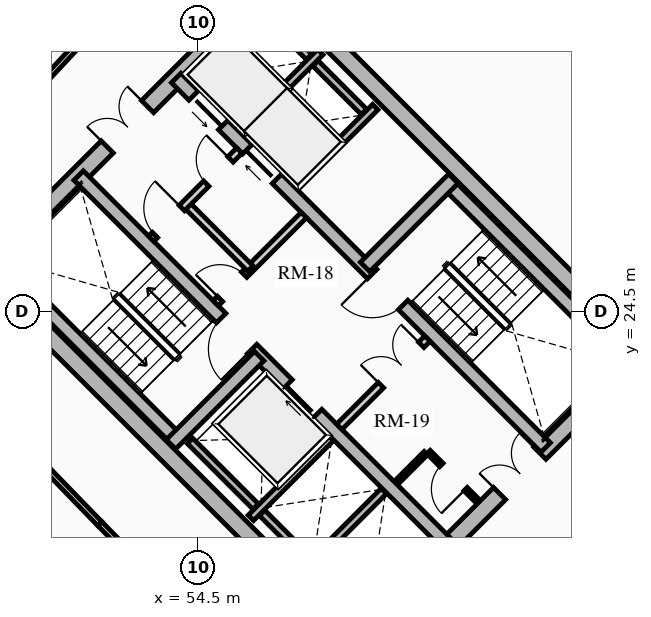
"""IFC4 building model, lengths in metres.
Left out: names, types, materials, properties, quantities, classifications, styles, units other than length and angle.
Written with IfcOpenShell. Run it as: python <this file> out.ifc"""

import sys

from ifc_helpers import new_model, si_unit, direction, frame, frame_2d, origin, place, context, subcontext, project, spatial, rectangle, extrude, source, transform, mapped, element, fill, save


model = new_model("IFC4")
c1 = context("Model", 3, precision=1e-05, world=origin(), true_north=direction((0.0, 1.0)))
c2 = subcontext(c1, "Body", "Model", "MODEL_VIEW")
j1 = project(units=[si_unit("LENGTHUNIT", "METRE"), si_unit("PLANEANGLEUNIT", "RADIAN")], contexts=[c1])
p1 = place(None, origin())
s1 = spatial("IfcSite", under=j1, at=p1, CompositionType="ELEMENT")
p2 = place(p1, origin())
s2 = spatial("IfcBuilding", under=s1, at=p2, CompositionType="ELEMENT")
p3 = place(p2, frame((0.0, 0.0, 113.8)))
s3 = spatial("IfcBuildingStorey", under=s2, at=p3, CompositionType="ELEMENT", Elevation=113.8)
for number, where, z_axis, x_axis in (
    (1, (58.737, 15.697, 0.0), (0.0, 0.0, 1.0), (-0.707, 0.707, 0.0)),
    (2, (66.303, 23.263, 0.0), (0.0, 0.0, 1.0), (-0.707, 0.707, 0.0)),
):
    element("IfcWall", number, at=place(p3, frame(where, z_axis=z_axis, x_axis=x_axis)), inside=s3, PredefinedType="SHEAR", context=c2, shape_type="SweptSolid", body=[
        extrude(rectangle(XDim=14.2, YDim=0.45, at=frame_2d((7.1, 0.0))), origin(), (0.0, 0.0, 1.0), 2.91),
    ])
p4 = place(p3, frame((58.578, 15.856, 0.0), z_axis=(0.0, 0.0, 1.0), x_axis=(0.707106781187, 0.707106781187, 0.0)))
e3 = element("IfcWall", 3, at=p4, inside=s3, PredefinedType="SHEAR", context=c2, shape_type="SweptSolid", body=[
    extrude(rectangle(XDim=10.7, YDim=0.45, at=frame_2d((5.35, 0.0))), origin(), (0.0, 0.0, 1.0), 2.91),
])
m1 = source(origin(), c2, "Body", "SweptSolid", [
    extrude(rectangle(XDim=1.5, YDim=2.02, at=frame_2d((0.75, 1.01))), frame((0.0, 0.235, 0.0), z_axis=(0.0, -1.0, 0.0), x_axis=(1.0, 0.0, 0.0)), (0.0, 0.0, 1.0), 0.47),
])
p5 = place(p4, frame((5.45, 0.0, 0.0)))
e4 = element("IfcOpeningElement", 4, at=p5, cuts=e3, PredefinedType="OPENING", context=c2, shape_type="MappedRepresentation", body=[
    mapped(m1, transform((0.0, 0.0, 0.0), x_axis=(1.0, 0.0, 0.0), y_axis=(0.0, 1.0, 0.0), z_axis=(0.0, 0.0, 1.0), scale=1.0)),
])
p6 = place(p3, frame((48.856, 25.578, 0.0), z_axis=(0.0, 0.0, 1.0), x_axis=(0.707106781187, 0.707106781187, 0.0)))
e5 = element("IfcWall", 5, at=p6, inside=s3, PredefinedType="SHEAR", context=c2, shape_type="SweptSolid", body=[
    extrude(rectangle(XDim=10.7, YDim=0.45, at=frame_2d((5.35, 0.0))), origin(), (0.0, 0.0, 1.0), 2.91),
])
p7 = place(p6, frame((4.6, 0.0, 0.0)))
e6 = element("IfcOpeningElement", 6, at=p7, cuts=e5, PredefinedType="OPENING", context=c2, shape_type="MappedRepresentation", body=[
    mapped(m1, transform((0.0, 0.0, 0.0), x_axis=(1.0, 0.0, 0.0), y_axis=(0.0, 1.0, 0.0), z_axis=(0.0, 0.0, 1.0), scale=1.0)),
])
p8 = place(p3, frame((61.078, 18.355, 0.0), z_axis=(0.0, 0.0, 1.0), x_axis=(-0.707106781187, 0.707106781187, 0.0)))
e7 = element("IfcWall", 7, at=p8, inside=s3, PredefinedType="SHEAR", context=c2, shape_type="SweptSolid", body=[
    extrude(rectangle(XDim=13.75, YDim=0.35, at=frame_2d((6.875, 0.0))), origin(), (0.0, 0.0, 1.0), 2.91),
])
m2 = source(origin(), c2, "Body", "SweptSolid", [
    extrude(rectangle(XDim=1.1, YDim=2.015, at=frame_2d((0.55, 1.007))), frame((0.0, 0.185, 0.0), z_axis=(0.0, -1.0, 0.0), x_axis=(1.0, 0.0, 0.0)), (0.0, 0.0, 1.0), 0.37),
])
p9 = place(p8, frame((4.875, 0.0, 0.0)))
e8 = element("IfcOpeningElement", 8, at=p9, cuts=e7, PredefinedType="OPENING", context=c2, shape_type="MappedRepresentation", body=[
    mapped(m2, transform((0.0, 0.0, 0.0), x_axis=(1.0, 0.0, 0.0), y_axis=(0.0, 1.0, 0.0), z_axis=(0.0, 0.0, 1.0), scale=1.0)),
])
m3 = source(origin(), c2, "Body", "SweptSolid", [
    extrude(rectangle(XDim=1.15, YDim=2.02, at=frame_2d((0.575, 1.01))), frame((0.0, 0.185, 0.0), z_axis=(0.0, -1.0, 0.0), x_axis=(1.0, 0.0, 0.0)), (0.0, 0.0, 1.0), 0.37),
])
p10 = place(p8, frame((7.295, 0.0, 0.0)))
e9 = element("IfcOpeningElement", 9, at=p10, cuts=e7, PredefinedType="OPENING", context=c2, shape_type="MappedRepresentation", body=[
    mapped(m3, transform((0.0, 0.0, 0.0), x_axis=(1.0, 0.0, 0.0), y_axis=(0.0, 1.0, 0.0), z_axis=(0.0, 0.0, 1.0), scale=1.0)),
])
p11 = place(p3, frame((63.645, 20.922, 0.0), z_axis=(0.0, 0.0, 1.0), x_axis=(-0.707106781187, 0.707106781187, 0.0)))
e10 = element("IfcWall", 10, at=p11, inside=s3, PredefinedType="SHEAR", context=c2, shape_type="SweptSolid", body=[
    extrude(rectangle(XDim=13.75, YDim=0.35, at=frame_2d((6.875, 0.0))), origin(), (0.0, 0.0, 1.0), 2.91),
])
p12 = place(p11, frame((10.0, 0.0, 0.0)))
e11 = element("IfcOpeningElement", 11, at=p12, cuts=e10, PredefinedType="OPENING", context=c2, shape_type="MappedRepresentation", body=[
    mapped(m2, transform((0.0, 0.0, 0.0), x_axis=(1.0, 0.0, 0.0), y_axis=(0.0, 1.0, 0.0), z_axis=(0.0, 0.0, 1.0), scale=1.0)),
])
p13 = place(p11, frame((12.0, 0.0, 0.0)))
e12 = element("IfcOpeningElement", 12, at=p13, cuts=e10, PredefinedType="OPENING", context=c2, shape_type="MappedRepresentation", body=[
    mapped(m2, transform((0.0, 0.0, 0.0), x_axis=(1.0, 0.0, 0.0), y_axis=(0.0, 1.0, 0.0), z_axis=(0.0, 0.0, 1.0), scale=1.0)),
])
p14 = place(p11, frame((5.305, 0.0, 0.0)))
e13 = element("IfcOpeningElement", 13, at=p14, cuts=e10, PredefinedType="OPENING", context=c2, shape_type="MappedRepresentation", body=[
    mapped(m3, transform((0.0, 0.0, 0.0), x_axis=(1.0, 0.0, 0.0), y_axis=(0.0, 1.0, 0.0), z_axis=(0.0, 0.0, 1.0), scale=1.0)),
])
p15 = place(p3, frame((53.922, 21.141, 0.0), z_axis=(0.0, 0.0, 1.0), x_axis=(-0.707088616009, 0.707124945897, 0.0)))
e14 = element("IfcWall", 14, at=p15, inside=s3, PredefinedType="SHEAR", context=c2, shape_type="SweptSolid", body=[
    extrude(rectangle(XDim=6.72, YDim=0.35, at=frame_2d((3.36, 0.0))), origin(), (0.0, 0.0, 1.0), 2.91),
])
p16 = place(p3, frame((53.784, 21.003, 0.0), z_axis=(0.0, 0.0, 1.0), x_axis=(0.707106781187, 0.707106781187, 0.0)))
e15 = element("IfcWall", 15, at=p16, inside=s3, PredefinedType="SHEAR", context=c2, shape_type="SweptSolid", body=[
    extrude(rectangle(XDim=3.285, YDim=0.35, at=frame_2d((1.643, 0.0))), origin(), (0.0, 0.0, 1.0), 2.91),
])
p17 = place(p3, frame((65.83, 23.107, 0.0), z_axis=(0.0, 0.0, 1.0), x_axis=(-0.707088616009, 0.707124945897, 0.0)))
e16 = element("IfcWall", 16, at=p17, inside=s3, PredefinedType="SHEAR", context=c2, shape_type="SweptSolid", body=[
    extrude(rectangle(XDim=6.72, YDim=0.35, at=frame_2d((3.36, 0.0))), origin(), (0.0, 0.0, 1.0), 2.91),
])
p18 = place(p3, frame((58.893, 25.674, 0.0), z_axis=(0.0, 0.0, 1.0), x_axis=(0.707106781187, 0.707106781187, 0.0)))
e17 = element("IfcWall", 17, at=p18, inside=s3, PredefinedType="SHEAR", context=c2, shape_type="SweptSolid", body=[
    extrude(rectangle(XDim=3.285, YDim=0.35, at=frame_2d((1.643, 0.0))), origin(), (0.0, 0.0, 1.0), 2.91),
])
p19 = place(p3, frame((55.888, 19.069, 0.0), z_axis=(0.0, 0.0, 1.0), x_axis=(0.707106781187, 0.707106781187, 0.0)))
e18 = element("IfcWall", 18, at=p19, inside=s3, PredefinedType="SHEAR", context=c2, shape_type="SweptSolid", body=[
    extrude(rectangle(XDim=2.97, YDim=0.2, at=frame_2d((1.485, 0.0))), origin(), (0.0, 0.0, 1.0), 2.91),
])
p20 = place(p3, frame((56.015, 19.366, 0.0), z_axis=(0.0, 0.0, 1.0), x_axis=(-0.707106781187, 0.707106781187, 0.0)))
e19 = element("IfcWall", 19, at=p20, inside=s3, PredefinedType="SHEAR", context=c2, shape_type="SweptSolid", body=[
    extrude(rectangle(XDim=2.44, YDim=0.2, at=frame_2d((1.22, 0.0))), origin(), (0.0, 0.0, 1.0), 2.91),
])
p21 = place(p3, frame((57.284, 17.673, 0.0), z_axis=(0.0, 0.0, 1.0), x_axis=(0.707147878904, 0.70706568108, 0.0)))
e20 = element("IfcWall", 20, at=p21, inside=s3, PredefinedType="SHEAR", context=c2, shape_type="SweptSolid", body=[
    extrude(rectangle(XDim=2.97, YDim=0.2, at=frame_2d((1.485, 0.0))), origin(), (0.0, 0.0, 1.0), 2.91),
])
p22 = place(p3, frame((57.412, 17.97, 0.0), z_axis=(0.0, 0.0, 1.0), x_axis=(-0.707106781187, 0.707106781187, 0.0)))
e21 = element("IfcWall", 21, at=p22, inside=s3, PredefinedType="SHEAR", context=c2, shape_type="SweptSolid", body=[
    extrude(rectangle(XDim=1.735, YDim=0.2, at=frame_2d((0.867, 0.0))), origin(), (0.0, 0.0, 1.0), 2.91),
])
p23 = place(p3, frame((57.062, 27.781, 0.0), z_axis=(0.0, 0.0, 1.0), x_axis=(0.707106781187, 0.707106781187, 0.0)))
e22 = element("IfcWall", 22, at=p23, inside=s3, PredefinedType="SHEAR", context=c2, shape_type="SweptSolid", body=[
    extrude(rectangle(XDim=2.97, YDim=0.2, at=frame_2d((1.485, 0.0))), origin(), (0.0, 0.0, 1.0), 2.91),
])
p24 = place(p3, frame((55.615, 29.227, 0.0), z_axis=(0.0, 0.0, 1.0), x_axis=(0.707147878904, 0.70706568108, 0.0)))
e23 = element("IfcWall", 23, at=p24, inside=s3, PredefinedType="SHEAR", context=c2, shape_type="SweptSolid", body=[
    extrude(rectangle(XDim=2.97, YDim=0.2, at=frame_2d((1.485, 0.0))), origin(), (0.0, 0.0, 1.0), 2.91),
])
p25 = place(p3, frame((58.865, 29.754, 0.0), z_axis=(0.0, 0.0, 1.0), x_axis=(-0.707174411312, 0.707039144592, 0.0)))
e24 = element("IfcWall", 24, at=p25, inside=s3, PredefinedType="SHEAR", context=c2, shape_type="SweptSolid", body=[
    extrude(rectangle(XDim=1.805, YDim=0.2, at=frame_2d((0.902, 0.0))), origin(), (0.0, 0.0, 1.0), 2.91),
])
p26 = place(p3, frame((57.419, 31.2, 0.0), z_axis=(0.0, 0.0, 1.0), x_axis=(-0.707032117043, 0.707181437447, 0.0)))
e25 = element("IfcWall", 25, at=p26, inside=s3, PredefinedType="SHEAR", context=c2, shape_type="SweptSolid", body=[
    extrude(rectangle(XDim=1.635, YDim=0.2, at=frame_2d((0.817, 0.0))), origin(), (0.0, 0.0, 1.0), 2.91),
])
p27 = place(p3, frame((58.214, 21.467, 0.0), z_axis=(0.0, 0.0, 1.0), x_axis=(0.707106781187, 0.707106781187, 0.0)))
e26 = element("IfcWall", 26, at=p27, inside=s3, PredefinedType="PARTITIONING", context=c2, shape_type="SweptSolid", body=[
    extrude(rectangle(XDim=3.28, YDim=0.2, at=frame_2d((1.64, 0.0))), origin(), (0.0, 0.0, 1.0), 2.655),
])
m4 = source(origin(), c2, "Body", "SweptSolid", [
    extrude(rectangle(XDim=1.5, YDim=2.02, at=frame_2d((0.75, 1.01))), frame((0.0, 0.11, 0.0), z_axis=(0.0, -1.0, 0.0), x_axis=(1.0, 0.0, 0.0)), (0.0, 0.0, 1.0), 0.22),
])
p28 = place(p27, frame((1.55, 0.0, 0.0)))
e27 = element("IfcOpeningElement", 27, at=p28, cuts=e26, PredefinedType="OPENING", context=c2, shape_type="MappedRepresentation", body=[
    mapped(m4, transform((0.0, 0.0, 0.0), x_axis=(1.0, 0.0, 0.0), y_axis=(0.0, 1.0, 0.0), z_axis=(0.0, 0.0, 1.0), scale=1.0)),
])
p29 = place(p3, frame((54.961, 24.719, 0.0), z_axis=(0.0, 0.0, 1.0), x_axis=(0.707106781187, 0.707106781187, 0.0)))
e28 = element("IfcWall", 28, at=p29, inside=s3, PredefinedType="PARTITIONING", context=c2, shape_type="SweptSolid", body=[
    extrude(rectangle(XDim=3.28, YDim=0.2, at=frame_2d((1.64, 0.0))), origin(), (0.0, 0.0, 1.0), 2.655),
])
m5 = source(origin(), c2, "Body", "SweptSolid", [
    extrude(rectangle(XDim=0.9, YDim=2.005, at=frame_2d((0.45, 1.002))), frame((0.0, 0.11, 0.0), z_axis=(0.0, -1.0, 0.0), x_axis=(1.0, 0.0, 0.0)), (0.0, 0.0, 1.0), 0.22),
])
p30 = place(p29, frame((0.16, 0.0, 0.0)))
e29 = element("IfcOpeningElement", 29, at=p30, cuts=e28, PredefinedType="OPENING", context=c2, shape_type="MappedRepresentation", body=[
    mapped(m5, transform((0.0, 0.0, 0.0), x_axis=(1.0, 0.0, 0.0), y_axis=(0.0, 1.0, 0.0), z_axis=(0.0, 0.0, 1.0), scale=1.0)),
])
p31 = place(p3, frame((55.874, 25.631, 0.0), z_axis=(0.0, 0.0, 1.0), x_axis=(-0.707157639372, 0.707055919343, 0.0)))
e30 = element("IfcWall", 30, at=p31, inside=s3, PredefinedType="PARTITIONING", context=c2, shape_type="SweptSolid", body=[
    extrude(rectangle(XDim=2.4, YDim=0.2, at=frame_2d((1.2, 0.0))), origin(), (0.0, 0.0, 1.0), 2.655),
])
p32 = place(p3, frame((53.264, 26.416, 0.0), z_axis=(0.0, 0.0, 1.0), x_axis=(0.707106781187, 0.707106781187, 0.0)))
e31 = element("IfcWall", 31, at=p32, inside=s3, PredefinedType="PARTITIONING", context=c2, shape_type="SweptSolid", body=[
    extrude(rectangle(XDim=3.28, YDim=0.2, at=frame_2d((1.64, 0.0))), origin(), (0.0, 0.0, 1.0), 2.655),
])
m6 = source(origin(), c2, "Body", "SweptSolid", [
    extrude(rectangle(XDim=1.0, YDim=2.015, at=frame_2d((0.5, 1.007))), frame((0.0, 0.11, 0.0), z_axis=(0.0, -1.0, 0.0), x_axis=(1.0, 0.0, 0.0)), (0.0, 0.0, 1.0), 0.22),
])
p33 = place(p32, frame((0.14, 0.0, 0.0)))
e32 = element("IfcOpeningElement", 32, at=p33, cuts=e31, PredefinedType="OPENING", context=c2, shape_type="MappedRepresentation", body=[
    mapped(m6, transform((0.0, 0.0, 0.0), x_axis=(1.0, 0.0, 0.0), y_axis=(0.0, 1.0, 0.0), z_axis=(0.0, 0.0, 1.0), scale=1.0)),
])
p34 = place(p32, frame((2.05, 0.0, 0.0)))
e33 = element("IfcOpeningElement", 33, at=p34, cuts=e31, PredefinedType="OPENING", context=c2, shape_type="MappedRepresentation", body=[
    mapped(m5, transform((0.0, 0.0, 0.0), x_axis=(1.0, 0.0, 0.0), y_axis=(0.0, 1.0, 0.0), z_axis=(0.0, 0.0, 1.0), scale=1.0)),
])
p35 = place(p3, frame((61.835, 19.529, 0.0), z_axis=(0.0, 0.0, 1.0), x_axis=(-0.707174592913, 0.707038962956, 0.0)))
e34 = element("IfcWall", 34, at=p35, inside=s3, PredefinedType="PARTITIONING", context=c2, shape_type="SweptSolid", body=[
    extrude(rectangle(XDim=1.8, YDim=0.125, at=frame_2d((0.9, 0.0))), origin(), (0.0, 0.0, 1.0), 2.655),
])
m7 = source(origin(), c2, "Body", "SweptSolid", [
    extrude(rectangle(XDim=0.9, YDim=2.005, at=frame_2d((0.45, 1.002))), frame((0.0, 0.073, 0.0), z_axis=(0.0, -1.0, 0.0), x_axis=(1.0, 0.0, 0.0)), (0.0, 0.0, 1.0), 0.145),
])
p36 = place(p35, frame((0.42, 0.0, 0.0)))
e35 = element("IfcOpeningElement", 35, at=p36, cuts=e34, PredefinedType="OPENING", context=c2, shape_type="MappedRepresentation", body=[
    mapped(m7, transform((0.0, 0.0, 0.0), x_axis=(1.0, 0.0, 0.0), y_axis=(0.0, 1.0, 0.0), z_axis=(0.0, 0.0, 1.0), scale=1.0)),
])
p37 = place(p3, frame((59.713, 19.996, 0.0), z_axis=(0.0, 0.0, 1.0), x_axis=(0.707217726, 0.706995818963, 0.0)))
e36 = element("IfcWall", 36, at=p37, inside=s3, PredefinedType="PARTITIONING", context=c2, shape_type="SweptSolid", body=[
    extrude(rectangle(XDim=1.1, YDim=0.125, at=frame_2d((0.55, 0.0))), origin(), (0.0, 0.0, 1.0), 2.655),
])
p38 = place(p3, frame((52.043, 32.28, 0.0), z_axis=(0.0, 0.0, 1.0), x_axis=(-0.682606081633, -0.730786519661, 0.0)))
e37 = element("IfcWall", 37, at=p38, inside=s3, PredefinedType="PARTITIONING", context=c2, shape_type="SweptSolid", body=[
    extrude(rectangle(XDim=6.527, YDim=0.15, at=frame_2d((3.263, 0.0))), origin(), (0.0, 0.0, 1.0), 2.225),
])
p39 = place(p3, frame((47.706, 23.253, 0.0), z_axis=(0.0, 0.0, 1.0), x_axis=(0.696179266346, -0.717867974707, 0.0)))
e38 = element("IfcWall", 38, at=p39, inside=s3, PredefinedType="PARTITIONING", context=c2, shape_type="SweptSolid", body=[
    extrude(rectangle(XDim=6.045, YDim=0.15, at=frame_2d((3.022, 0.0))), origin(), (0.0, 0.0, 1.0), 2.655),
])
m8 = source(origin(), c2, "Body", "SweptSolid", [
    extrude(rectangle(XDim=1.05, YDim=2.015, at=frame_2d((0.525, 1.007))), frame((0.0, 0.085, 0.0), z_axis=(0.0, -1.0, 0.0), x_axis=(1.0, 0.0, 0.0)), (0.0, 0.0, 1.0), 0.17),
])
p40 = place(p39, frame((2.497, 0.0, 0.0)))
e39 = element("IfcOpeningElement", 39, at=p40, cuts=e38, PredefinedType="OPENING", context=c2, shape_type="MappedRepresentation", body=[
    mapped(m8, transform((0.0, 0.0, 0.0), x_axis=(1.0, 0.0, 0.0), y_axis=(0.0, 1.0, 0.0), z_axis=(0.0, 0.0, 1.0), scale=1.0)),
])
p41 = place(p3, frame((51.914, 18.914, 0.0), z_axis=(0.0, 0.0, 1.0), x_axis=(0.699999313799, -0.714143515465, 0.0)))
e40 = element("IfcWall", 40, at=p41, inside=s3, PredefinedType="PARTITIONING", context=c2, shape_type="SweptSolid", body=[
    extrude(rectangle(XDim=6.162, YDim=0.15, at=frame_2d((3.081, 0.0))), origin(), (0.0, 0.0, 1.0), 2.225),
])
p42 = place(p3, frame((62.903, 16.667, 0.0), z_axis=(0.0, 0.0, 1.0), x_axis=(0.682371947497, 0.731005147225, 0.0)))
e41 = element("IfcWall", 41, at=p42, inside=s3, PredefinedType="PARTITIONING", context=c2, shape_type="SweptSolid", body=[
    extrude(rectangle(XDim=6.642, YDim=0.15, at=frame_2d((3.321, 0.0))), origin(), (0.0, 0.0, 1.0), 2.225),
])
m9 = source(origin(), c2, "Body", "SweptSolid", [
    extrude(rectangle(XDim=1.1, YDim=2.015, at=frame_2d((0.55, 1.007))), frame((0.0, 0.025, 0.0), z_axis=(0.0, -1.0, 0.0), x_axis=(1.0, 0.0, 0.0)), (0.0, 0.0, 1.0), 0.05),
])
p43 = place(p9, origin())
e42 = element("IfcDoor", 42, at=p43, inside=s3, OperationType="SLIDING_TO_RIGHT", PredefinedType="DOOR", context=c2, shape_type="MappedRepresentation", body=[
    mapped(m9, transform((0.0, 0.0, 0.0), x_axis=(1.0, 0.0, 0.0), y_axis=(0.0, 1.0, 0.0), z_axis=(0.0, 0.0, 1.0), scale=1.0)),
])
fill(e8, e42)
p44 = place(p12, origin())
e43 = element("IfcDoor", 43, at=p44, inside=s3, OperationType="SLIDING_TO_RIGHT", PredefinedType="DOOR", context=c2, shape_type="MappedRepresentation", body=[
    mapped(m9, transform((0.0, 0.0, 0.0), x_axis=(1.0, 0.0, 0.0), y_axis=(0.0, 1.0, 0.0), z_axis=(0.0, 0.0, 1.0), scale=1.0)),
])
fill(e11, e43)
p45 = place(p13, origin())
e44 = element("IfcDoor", 44, at=p45, inside=s3, OperationType="SLIDING_TO_LEFT", PredefinedType="DOOR", context=c2, shape_type="MappedRepresentation", body=[
    mapped(m9, transform((0.0, 0.0, 0.0), x_axis=(1.0, 0.0, 0.0), y_axis=(0.0, 1.0, 0.0), z_axis=(0.0, 0.0, 1.0), scale=1.0)),
])
fill(e12, e44)
m10 = source(origin(), c2, "Body", "SweptSolid", [
    extrude(rectangle(XDim=1.15, YDim=2.02, at=frame_2d((0.575, 1.01))), frame((0.0, 0.025, 0.0), z_axis=(0.0, -1.0, 0.0), x_axis=(1.0, 0.0, 0.0)), (0.0, 0.0, 1.0), 0.05),
])
p46 = place(p10, origin())
e45 = element("IfcDoor", 45, at=p46, inside=s3, OperationType="SINGLE_SWING_LEFT", PredefinedType="DOOR", context=c2, shape_type="MappedRepresentation", body=[
    mapped(m10, transform((0.0, 0.0, 0.0), x_axis=(1.0, 0.0, 0.0), y_axis=(0.0, 1.0, 0.0), z_axis=(0.0, 0.0, 1.0), scale=1.0)),
])
fill(e9, e45)
p47 = place(p14, origin())
e46 = element("IfcDoor", 46, at=p47, inside=s3, OperationType="SINGLE_SWING_RIGHT", PredefinedType="DOOR", context=c2, shape_type="MappedRepresentation", body=[
    mapped(m10, transform((0.0, 0.0, 0.0), x_axis=(1.0, 0.0, 0.0), y_axis=(0.0, 1.0, 0.0), z_axis=(0.0, 0.0, 1.0), scale=1.0)),
])
fill(e13, e46)
m11 = source(origin(), c2, "Body", "SweptSolid", [
    extrude(rectangle(XDim=1.5, YDim=2.02, at=frame_2d((0.75, 1.01))), frame((0.0, 0.025, 0.0), z_axis=(0.0, -1.0, 0.0), x_axis=(1.0, 0.0, 0.0)), (0.0, 0.0, 1.0), 0.05),
])
p48 = place(p7, origin())
e47 = element("IfcDoor", 47, at=p48, inside=s3, OperationType="DOUBLE_DOOR_SINGLE_SWING", PredefinedType="DOOR", context=c2, shape_type="MappedRepresentation", body=[
    mapped(m11, transform((0.0, 0.0, 0.0), x_axis=(1.0, 0.0, 0.0), y_axis=(0.0, 1.0, 0.0), z_axis=(0.0, 0.0, 1.0), scale=1.0)),
])
fill(e6, e47)
p49 = place(p5, origin())
e48 = element("IfcDoor", 48, at=p49, inside=s3, OperationType="DOUBLE_DOOR_SINGLE_SWING", PredefinedType="DOOR", context=c2, shape_type="MappedRepresentation", body=[
    mapped(m11, transform((0.0, 0.0, 0.0), x_axis=(1.0, 0.0, 0.0), y_axis=(0.0, 1.0, 0.0), z_axis=(0.0, 0.0, 1.0), scale=1.0)),
])
fill(e4, e48)
p50 = place(p28, origin())
e49 = element("IfcDoor", 49, at=p50, inside=s3, OperationType="DOUBLE_DOOR_SINGLE_SWING", PredefinedType="DOOR", context=c2, shape_type="MappedRepresentation", body=[
    mapped(m11, transform((0.0, 0.0, 0.0), x_axis=(1.0, 0.0, 0.0), y_axis=(0.0, 1.0, 0.0), z_axis=(0.0, 0.0, 1.0), scale=1.0)),
])
fill(e27, e49)
m12 = source(origin(), c2, "Body", "SweptSolid", [
    extrude(rectangle(XDim=0.9, YDim=2.005, at=frame_2d((0.45, 1.002))), frame((0.0, 0.025, 0.0), z_axis=(0.0, -1.0, 0.0), x_axis=(1.0, 0.0, 0.0)), (0.0, 0.0, 1.0), 0.05),
])
p51 = place(p30, origin())
e50 = element("IfcDoor", 50, at=p51, inside=s3, OperationType="SINGLE_SWING_LEFT", PredefinedType="DOOR", context=c2, shape_type="MappedRepresentation", body=[
    mapped(m12, transform((0.0, 0.0, 0.0), x_axis=(1.0, 0.0, 0.0), y_axis=(0.0, 1.0, 0.0), z_axis=(0.0, 0.0, 1.0), scale=1.0)),
])
fill(e29, e50)
m13 = source(origin(), c2, "Body", "SweptSolid", [
    extrude(rectangle(XDim=1.0, YDim=2.015, at=frame_2d((0.5, 1.007))), frame((0.0, 0.025, 0.0), z_axis=(0.0, -1.0, 0.0), x_axis=(1.0, 0.0, 0.0)), (0.0, 0.0, 1.0), 0.05),
])
p52 = place(p33, origin())
e51 = element("IfcDoor", 51, at=p52, inside=s3, OperationType="SINGLE_SWING_RIGHT", PredefinedType="DOOR", context=c2, shape_type="MappedRepresentation", body=[
    mapped(m13, transform((0.0, 0.0, 0.0), x_axis=(1.0, 0.0, 0.0), y_axis=(0.0, 1.0, 0.0), z_axis=(0.0, 0.0, 1.0), scale=1.0)),
])
fill(e32, e51)
p53 = place(p36, origin())
e52 = element("IfcDoor", 52, at=p53, inside=s3, OperationType="SINGLE_SWING_LEFT", PredefinedType="DOOR", context=c2, shape_type="MappedRepresentation", body=[
    mapped(m12, transform((0.0, 0.0, 0.0), x_axis=(1.0, 0.0, 0.0), y_axis=(0.0, 1.0, 0.0), z_axis=(0.0, 0.0, 1.0), scale=1.0)),
])
fill(e35, e52)
p54 = place(p34, origin())
e53 = element("IfcDoor", 53, at=p54, inside=s3, OperationType="SINGLE_SWING_RIGHT", PredefinedType="DOOR", context=c2, shape_type="MappedRepresentation", body=[
    mapped(m12, transform((0.0, 0.0, 0.0), x_axis=(1.0, 0.0, 0.0), y_axis=(0.0, 1.0, 0.0), z_axis=(0.0, 0.0, 1.0), scale=1.0)),
])
fill(e33, e53)
save(model, sys.argv[1])
